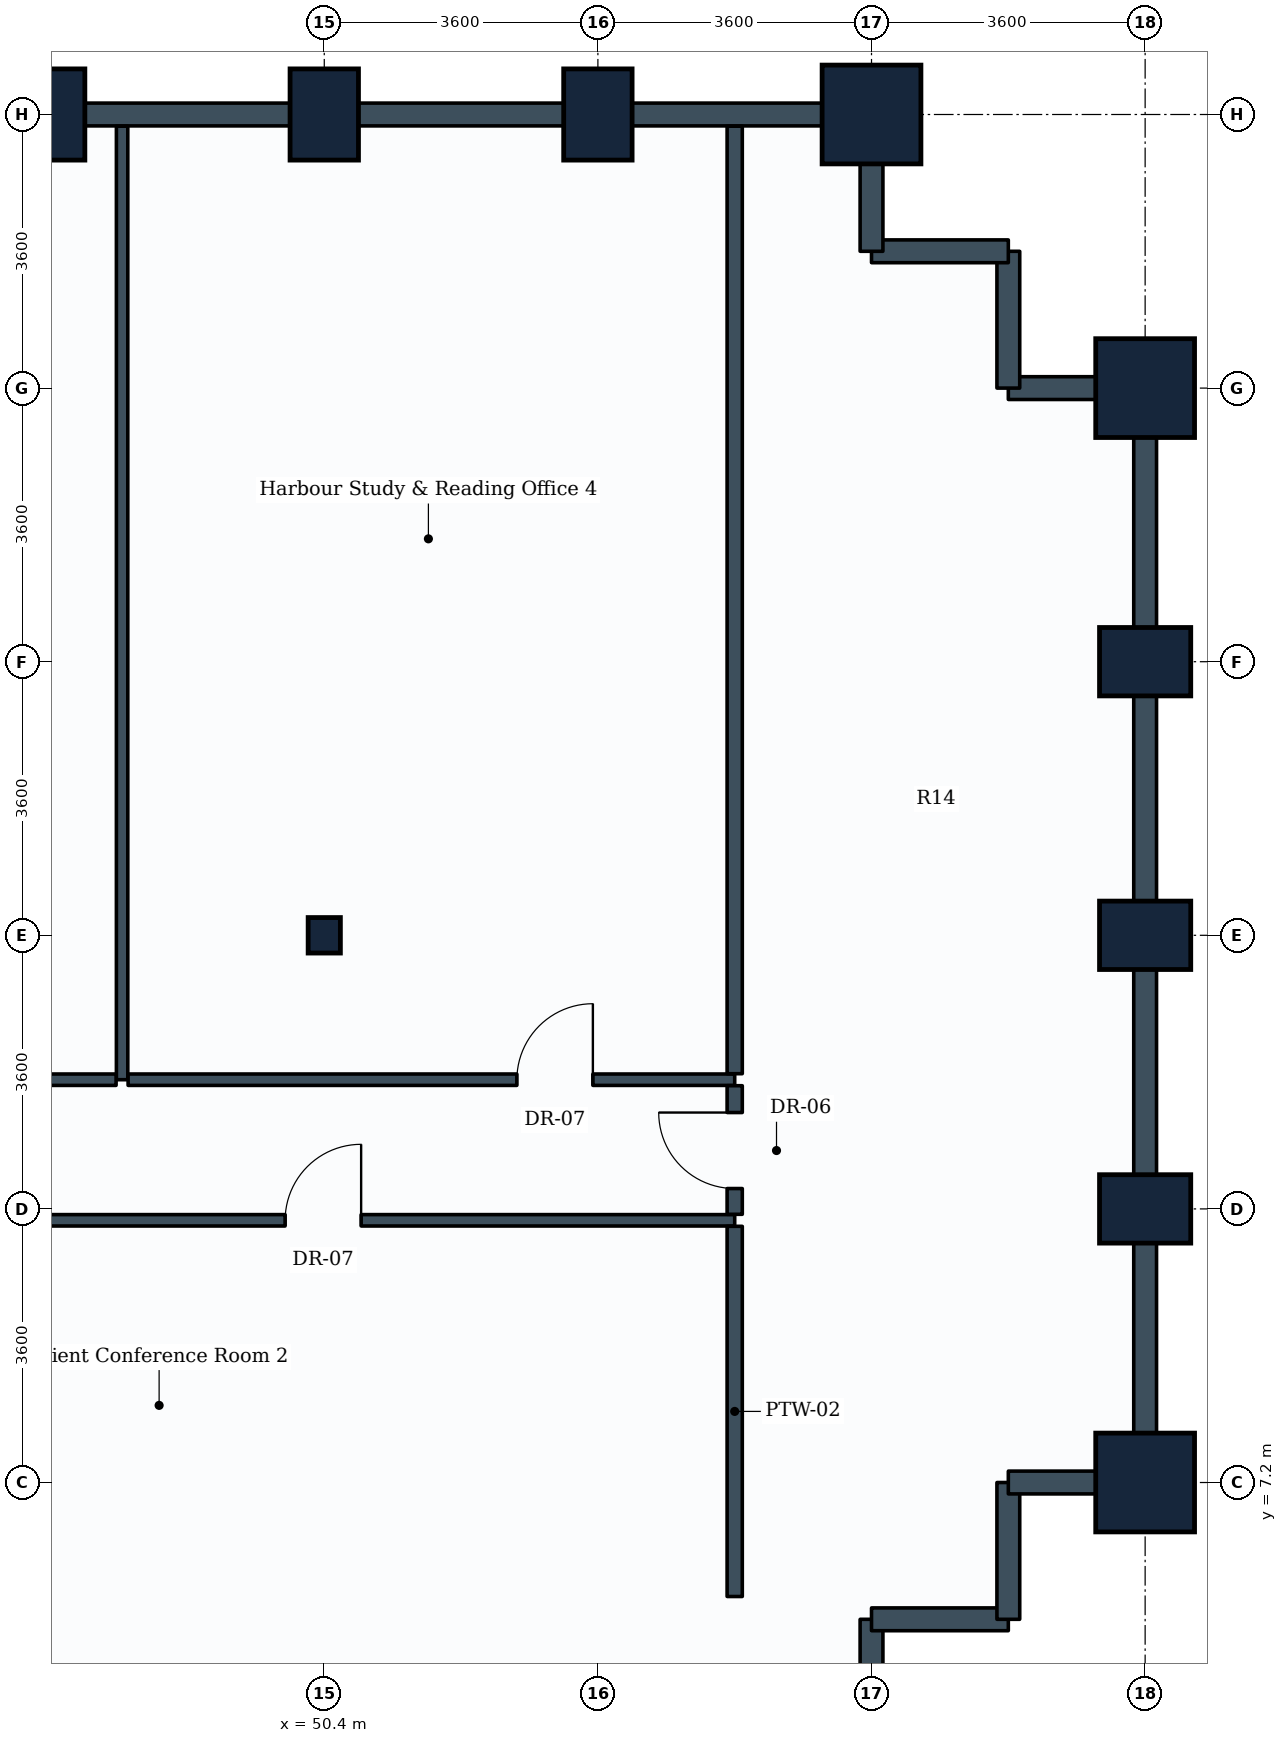
"""IFC4 building model, lengths in metres.
Left out: names, types, materials, properties, quantities, classifications, styles, units other than length and angle.
Written with IfcOpenShell. Run it as: python <this file> out.ifc"""

import sys

from ifc_helpers import new_model, si_unit, direction, frame, frame_2d, origin, origin_2d, place, context, subcontext, project, spatial, rectangle, i_section, extrude, element, fill, save


model = new_model("IFC4")
c1 = context("Model", 3, precision=1e-05, world=origin(), true_north=direction((0.0, 1.0)))
c2 = subcontext(c1, "Body", "Model", "MODEL_VIEW")
j1 = project(units=[si_unit("LENGTHUNIT", "METRE"), si_unit("PLANEANGLEUNIT", "RADIAN")], contexts=[c1])
p1 = place(None, origin())
s1 = spatial("IfcSite", under=j1, at=p1, CompositionType="ELEMENT")
p2 = place(p1, origin())
s2 = spatial("IfcBuilding", under=s1, at=p2, CompositionType="ELEMENT")
p3 = place(p2, frame((0.0, 0.0, 27.9)))
s3 = spatial("IfcBuildingStorey", under=s2, at=p3, CompositionType="ELEMENT", Elevation=27.9)
p4 = place(p3, frame((46.8, 25.2, 0.0), z_axis=(0.0, 0.0, 1.0), x_axis=(1.0, 0.0, 0.0)))
e1 = element("IfcColumn", 1, at=p4, inside=s3, PredefinedType="COLUMN", context=c2, shape_type="SweptSolid", body=[
    extrude(rectangle(XDim=0.9, YDim=1.2, at=origin_2d()), origin(), (0.0, 0.0, 1.0), 3.9),
])
p5 = place(p3, frame((50.4, 14.4, 0.0), z_axis=(0.0, 0.0, 1.0), x_axis=(1.0, 0.0, 0.0)))
e2 = element("IfcColumn", 2, at=p5, inside=s3, PredefinedType="COLUMN", context=c2, shape_type="SweptSolid", body=[
    extrude(i_section(OverallWidth=0.424, OverallDepth=0.467, WebThickness=0.033, FlangeThickness=0.053, FilletRadius=0.015, at=origin_2d()), origin(), (0.0, 0.0, 1.0), 3.9),
])
for number, where, z_axis, x_axis in (
    (3, (50.4, 25.2, 0.0), (0.0, 0.0, 1.0), (1.0, 0.0, 0.0)),
    (4, (54.0, 25.2, 0.0), (0.0, 0.0, 1.0), (1.0, 0.0, 0.0)),
):
    element("IfcColumn", number, at=place(p3, frame(where, z_axis=z_axis, x_axis=x_axis)), inside=s3, PredefinedType="COLUMN", context=c2, shape_type="SweptSolid", body=[
        extrude(rectangle(XDim=0.9, YDim=1.2, at=origin_2d()), origin(), (0.0, 0.0, 1.0), 3.9),
    ])
for number, where, z_axis, x_axis in (
    (5, (57.6, 25.2, 0.0), (0.0, 0.0, 1.0), (1.0, 0.0, 0.0)),
    (6, (61.2, 7.2, 0.0), (0.0, 0.0, 1.0), (1.0, 0.0, 0.0)),
):
    element("IfcColumn", number, at=place(p3, frame(where, z_axis=z_axis, x_axis=x_axis)), inside=s3, PredefinedType="COLUMN", context=c2, shape_type="SweptSolid", body=[
        extrude(rectangle(XDim=1.3, YDim=1.3, at=origin_2d()), origin(), (0.0, 0.0, 1.0), 3.9),
    ])
for number, where, z_axis, x_axis in (
    (7, (61.2, 10.8, 0.0), (0.0, 0.0, 1.0), (0.0, 1.0, 0.0)),
    (8, (61.2, 14.4, 0.0), (0.0, 0.0, 1.0), (0.0, 1.0, 0.0)),
    (9, (61.2, 18.0, 0.0), (0.0, 0.0, 1.0), (0.0, 1.0, 0.0)),
):
    element("IfcColumn", number, at=place(p3, frame(where, z_axis=z_axis, x_axis=x_axis)), inside=s3, PredefinedType="COLUMN", context=c2, shape_type="SweptSolid", body=[
        extrude(rectangle(XDim=0.9, YDim=1.2, at=origin_2d()), origin(), (0.0, 0.0, 1.0), 3.9),
    ])
p6 = place(p3, frame((61.2, 21.6, 0.0), z_axis=(0.0, 0.0, 1.0), x_axis=(0.0, 1.0, 0.0)))
e10 = element("IfcColumn", 10, at=p6, inside=s3, PredefinedType="COLUMN", context=c2, shape_type="SweptSolid", body=[
    extrude(rectangle(XDim=1.3, YDim=1.3, at=origin_2d()), origin(), (0.0, 0.0, 1.0), 3.9),
])
p7 = place(p3, frame((57.6, 5.4, 0.0), z_axis=(0.0, 0.0, 1.0), x_axis=(0.0, -1.0, 0.0)))
e11 = element("IfcWall", 11, at=p7, inside=s3, PredefinedType="STANDARD", context=c2, shape_type="SweptSolid", body=[
    extrude(rectangle(XDim=1.8, YDim=0.3, at=frame_2d((0.9, 0.0))), origin(), (0.0, 0.0, 1.0), 2.93),
])
p8 = place(p3, frame((59.4, 5.4, 0.0), z_axis=(0.0, 0.0, 1.0), x_axis=(-1.0, 0.0, 0.0)))
e12 = element("IfcWall", 12, at=p8, inside=s3, PredefinedType="STANDARD", context=c2, shape_type="SweptSolid", body=[
    extrude(rectangle(XDim=1.8, YDim=0.3, at=frame_2d((0.9, 0.0))), origin(), (0.0, 0.0, 1.0), 3.635),
])
p9 = place(p3, frame((59.4, 7.2, 0.0), z_axis=(0.0, 0.0, 1.0), x_axis=(0.0, -1.0, 0.0)))
e13 = element("IfcWall", 13, at=p9, inside=s3, PredefinedType="STANDARD", context=c2, shape_type="SweptSolid", body=[
    extrude(rectangle(XDim=1.8, YDim=0.3, at=frame_2d((0.9, 0.0))), origin(), (0.0, 0.0, 1.0), 3.635),
])
p10 = place(p3, frame((61.2, 7.2, 0.0), z_axis=(0.0, 0.0, 1.0), x_axis=(-1.0, 0.0, 0.0)))
e14 = element("IfcWall", 14, at=p10, inside=s3, PredefinedType="STANDARD", context=c2, shape_type="SweptSolid", body=[
    extrude(rectangle(XDim=1.8, YDim=0.3, at=frame_2d((0.9, 0.0))), origin(), (0.0, 0.0, 1.0), 2.93),
])
p11 = place(p3, frame((61.2, 10.8, 0.0), z_axis=(0.0, 0.0, 1.0), x_axis=(0.0, -1.0, 0.0)))
e15 = element("IfcWall", 15, at=p11, inside=s3, PredefinedType="STANDARD", context=c2, shape_type="SweptSolid", body=[
    extrude(rectangle(XDim=3.6, YDim=0.3, at=frame_2d((1.8, 0.0))), origin(), (0.0, 0.0, 1.0), 2.93),
])
p12 = place(p3, frame((61.2, 14.4, 0.0), z_axis=(0.0, 0.0, 1.0), x_axis=(0.0, -1.0, 0.0)))
e16 = element("IfcWall", 16, at=p12, inside=s3, PredefinedType="STANDARD", context=c2, shape_type="SweptSolid", body=[
    extrude(rectangle(XDim=3.6, YDim=0.3, at=frame_2d((1.8, 0.0))), origin(), (0.0, 0.0, 1.0), 2.93),
])
for number, where, z_axis, x_axis in (
    (17, (61.2, 18.0, 0.0), (0.0, 0.0, 1.0), (0.0, -1.0, 0.0)),
    (18, (61.2, 21.6, 0.0), (0.0, 0.0, 1.0), (0.0, -1.0, 0.0)),
):
    element("IfcWall", number, at=place(p3, frame(where, z_axis=z_axis, x_axis=x_axis)), inside=s3, PredefinedType="STANDARD", context=c2, shape_type="SweptSolid", body=[
        extrude(rectangle(XDim=3.6, YDim=0.3, at=frame_2d((1.8, 0.0))), origin(), (0.0, 0.0, 1.0), 2.93),
    ])
p13 = place(p3, frame((61.2, 21.6, 0.0), z_axis=(0.0, 0.0, 1.0), x_axis=(-1.0, 0.0, 0.0)))
e19 = element("IfcWall", 19, at=p13, inside=s3, PredefinedType="STANDARD", context=c2, shape_type="SweptSolid", body=[
    extrude(rectangle(XDim=1.8, YDim=0.3, at=frame_2d((0.9, 0.0))), origin(), (0.0, 0.0, 1.0), 2.93),
])
for number, where, z_axis, x_axis in (
    (20, (59.4, 23.4, 0.0), (0.0, 0.0, 1.0), (0.0, -1.0, 0.0)),
    (21, (57.6, 23.4, 0.0), (0.0, 0.0, 1.0), (1.0, 0.0, 0.0)),
):
    element("IfcWall", number, at=place(p3, frame(where, z_axis=z_axis, x_axis=x_axis)), inside=s3, PredefinedType="STANDARD", context=c2, shape_type="SweptSolid", body=[
        extrude(rectangle(XDim=1.8, YDim=0.3, at=frame_2d((0.9, 0.0))), origin(), (0.0, 0.0, 1.0), 3.635),
    ])
p14 = place(p3, frame((57.6, 25.2, 0.0), z_axis=(0.0, 0.0, 1.0), x_axis=(0.0, -1.0, 0.0)))
e22 = element("IfcWall", 22, at=p14, inside=s3, PredefinedType="STANDARD", context=c2, shape_type="SweptSolid", body=[
    extrude(rectangle(XDim=1.8, YDim=0.3, at=frame_2d((0.9, 0.0))), origin(), (0.0, 0.0, 1.0), 2.93),
])
for number, where, z_axis, x_axis in (
    (23, (54.0, 25.2, 0.0), (0.0, 0.0, 1.0), (1.0, 0.0, 0.0)),
    (24, (50.4, 25.2, 0.0), (0.0, 0.0, 1.0), (1.0, 0.0, 0.0)),
):
    element("IfcWall", number, at=place(p3, frame(where, z_axis=z_axis, x_axis=x_axis)), inside=s3, PredefinedType="STANDARD", context=c2, shape_type="SweptSolid", body=[
        extrude(rectangle(XDim=3.6, YDim=0.3, at=frame_2d((1.8, 0.0))), origin(), (0.0, 0.0, 1.0), 2.93),
    ])
p15 = place(p3, frame((46.8, 25.2, 0.0), z_axis=(0.0, 0.0, 1.0), x_axis=(1.0, 0.0, 0.0)))
e25 = element("IfcWall", 25, at=p15, inside=s3, PredefinedType="STANDARD", context=c2, shape_type="SweptSolid", body=[
    extrude(rectangle(XDim=3.6, YDim=0.3, at=frame_2d((1.8, 0.0))), origin(), (0.0, 0.0, 1.0), 2.93),
])
p16 = place(p3, frame((45.129, 10.65, 0.0), z_axis=(0.0, 0.0, 1.0), x_axis=(1.0, 0.0, 0.0)))
e26 = element("IfcWall", 26, at=p16, inside=s3, PredefinedType="PARTITIONING", context=c2, shape_type="SweptSolid", body=[
    extrude(rectangle(XDim=10.671, YDim=0.15, at=frame_2d((5.335, 0.0))), origin(), (0.0, 0.0, 1.0), 3.03),
])
p17 = place(p16, frame((4.756, 0.0, 0.0)))
e27 = element("IfcOpeningElement", 27, at=p17, cuts=e26, PredefinedType="OPENING", context=c2, shape_type="SweptSolid", body=[
    extrude(rectangle(XDim=1.0, YDim=2.1, at=frame_2d((0.5, 1.05))), frame((0.0, 0.085, 0.0), z_axis=(0.0, -1.0, 0.0), x_axis=(1.0, 0.0, 0.0)), (0.0, 0.0, 1.0), 0.17),
])
p18 = place(p3, frame((47.74, 12.5, 0.0), z_axis=(0.0, 0.0, 1.0), x_axis=(0.0, 1.0, 0.0)))
e28 = element("IfcWall", 28, at=p18, inside=s3, PredefinedType="PARTITIONING", context=c2, shape_type="SweptSolid", body=[
    extrude(rectangle(XDim=12.546, YDim=0.15, at=frame_2d((6.273, 0.0))), origin(), (0.0, 0.0, 1.0), 2.93),
])
p19 = place(p3, frame((39.0, 12.5, 0.0), z_axis=(0.0, 0.0, 1.0), x_axis=(1.0, 0.0, 0.0)))
e29 = element("IfcWall", 29, at=p19, inside=s3, PredefinedType="PARTITIONING", context=c2, shape_type="SweptSolid", body=[
    extrude(rectangle(XDim=8.661, YDim=0.15, at=frame_2d((4.331, 0.0))), origin(), (0.0, 0.0, 1.0), 3.04),
])
p20 = place(p19, frame((6.742, 0.0, 0.0)))
e30 = element("IfcOpeningElement", 30, at=p20, cuts=e29, PredefinedType="OPENING", context=c2, shape_type="SweptSolid", body=[
    extrude(rectangle(XDim=1.0, YDim=2.1, at=frame_2d((0.5, 1.05))), frame((0.0, 0.085, 0.0), z_axis=(0.0, -1.0, 0.0), x_axis=(1.0, 0.0, 0.0)), (0.0, 0.0, 1.0), 0.17),
])
p21 = place(p3, frame((47.819, 12.5, 0.0), z_axis=(0.0, 0.0, 1.0), x_axis=(1.0, 0.0, 0.0)))
e31 = element("IfcWall", 31, at=p21, inside=s3, PredefinedType="PARTITIONING", context=c2, shape_type="SweptSolid", body=[
    extrude(rectangle(XDim=7.981, YDim=0.15, at=frame_2d((3.99, 0.0))), origin(), (0.0, 0.0, 1.0), 3.04),
])
p22 = place(p21, frame((5.115, 0.0, 0.0)))
e32 = element("IfcOpeningElement", 32, at=p22, cuts=e31, PredefinedType="OPENING", context=c2, shape_type="SweptSolid", body=[
    extrude(rectangle(XDim=1.0, YDim=2.1, at=frame_2d((0.5, 1.05))), frame((0.0, 0.085, 0.0), z_axis=(0.0, -1.0, 0.0), x_axis=(1.0, 0.0, 0.0)), (0.0, 0.0, 1.0), 0.17),
])
p23 = place(p3, frame((55.8, 5.7, 0.0), z_axis=(0.0, 0.0, 1.0), x_axis=(0.0, 1.0, 0.0)))
e33 = element("IfcWall", 33, at=p23, inside=s3, PredefinedType="PARTITIONING", context=c2, shape_type="SweptSolid", body=[
    extrude(rectangle(XDim=4.871, YDim=0.2, at=frame_2d((2.436, 0.0))), origin(), (0.0, 0.0, 1.0), 3.635),
])
p24 = place(p3, frame((55.8, 12.579, 0.0), z_axis=(0.0, 0.0, 1.0), x_axis=(0.0, 1.0, 0.0)))
e34 = element("IfcWall", 34, at=p24, inside=s3, PredefinedType="PARTITIONING", context=c2, shape_type="SweptSolid", body=[
    extrude(rectangle(XDim=12.467, YDim=0.2, at=frame_2d((6.233, 0.0))), origin(), (0.0, 0.0, 1.0), 2.93),
])
p25 = place(p3, frame((55.8, 10.729, 0.0), z_axis=(0.0, 0.0, 1.0), x_axis=(0.0, 1.0, 0.0)))
e35 = element("IfcWall", 35, at=p25, inside=s3, PredefinedType="PARTITIONING", context=c2, shape_type="SweptSolid", body=[
    extrude(rectangle(XDim=1.692, YDim=0.2, at=frame_2d((0.846, 0.0))), origin(), (0.0, 0.0, 1.0), 3.635),
])
p26 = place(p25, frame((0.339, 0.0, 0.0)))
e36 = element("IfcOpeningElement", 36, at=p26, cuts=e35, PredefinedType="OPENING", context=c2, shape_type="SweptSolid", body=[
    extrude(rectangle(XDim=1.0, YDim=2.1, at=frame_2d((0.5, 1.05))), frame((0.0, 0.11, 0.0), z_axis=(0.0, -1.0, 0.0), x_axis=(1.0, 0.0, 0.0)), (0.0, 0.0, 1.0), 0.22),
])
p27 = place(p17, origin())
e37 = element("IfcDoor", 37, at=p27, inside=s3, OperationType="SINGLE_SWING_RIGHT", PredefinedType="DOOR", context=c2, shape_type="SweptSolid", body=[
    extrude(rectangle(XDim=1.0, YDim=2.1, at=frame_2d((0.5, 1.05))), frame((0.0, 0.025, 0.0), z_axis=(0.0, -1.0, 0.0), x_axis=(1.0, 0.0, 0.0)), (0.0, 0.0, 1.0), 0.05),
])
fill(e27, e37)
p28 = place(p22, origin())
e38 = element("IfcDoor", 38, at=p28, inside=s3, OperationType="SINGLE_SWING_RIGHT", PredefinedType="DOOR", context=c2, shape_type="SweptSolid", body=[
    extrude(rectangle(XDim=1.0, YDim=2.1, at=frame_2d((0.5, 1.05))), frame((0.0, 0.025, 0.0), z_axis=(0.0, -1.0, 0.0), x_axis=(1.0, 0.0, 0.0)), (0.0, 0.0, 1.0), 0.05),
])
fill(e32, e38)
p29 = place(p26, origin())
e39 = element("IfcDoor", 39, at=p29, inside=s3, OperationType="SINGLE_SWING_RIGHT", PredefinedType="DOOR", context=c2, shape_type="SweptSolid", body=[
    extrude(rectangle(XDim=1.0, YDim=2.1, at=frame_2d((0.5, 1.05))), frame((0.0, 0.025, 0.0), z_axis=(0.0, -1.0, 0.0), x_axis=(1.0, 0.0, 0.0)), (0.0, 0.0, 1.0), 0.05),
])
fill(e36, e39)
save(model, sys.argv[1])
